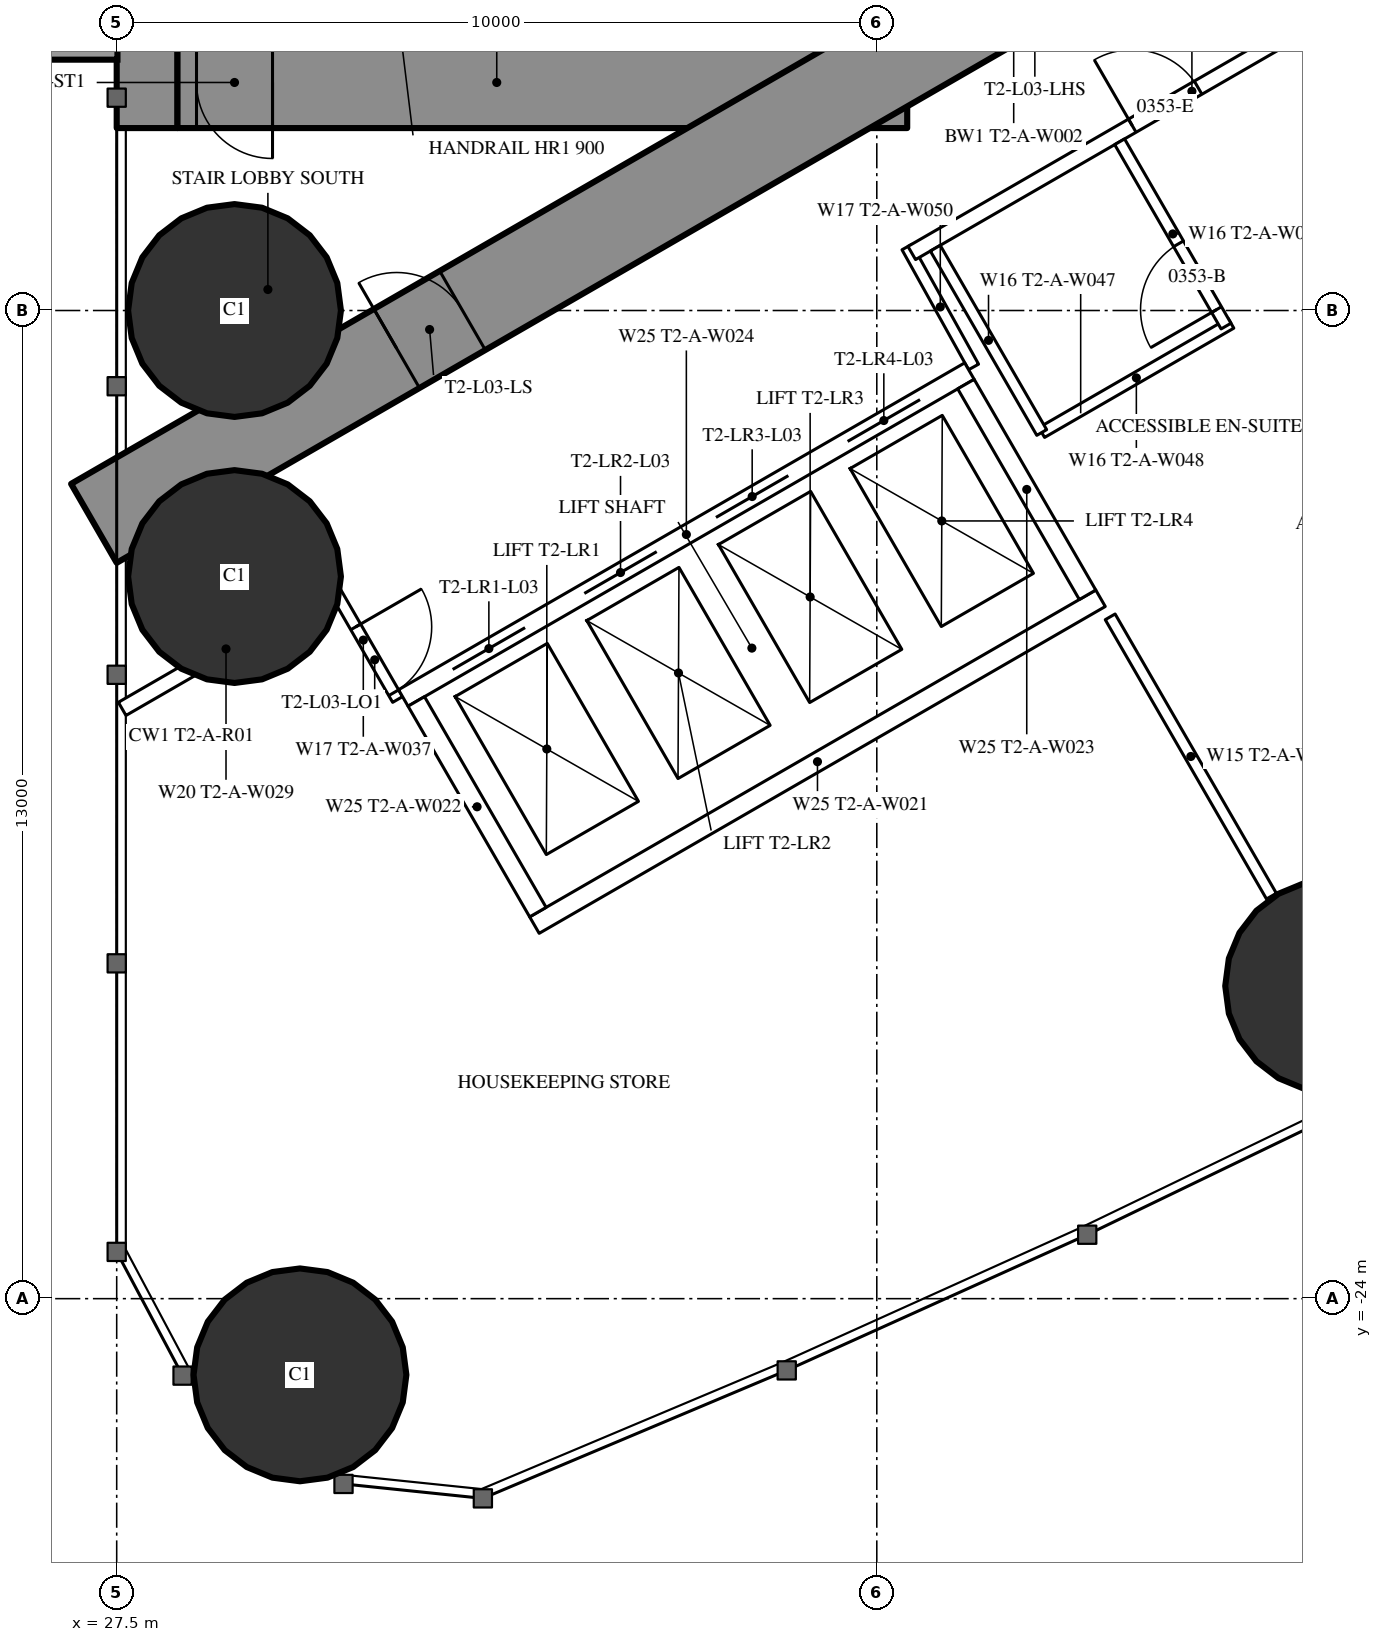
"""IFC4 building model, lengths in metres.
Left out: names, types, materials, properties, quantities, classifications, styles, units other than length and angle.
Written with IfcOpenShell. Run it as: python <this file> out.ifc"""

import sys

from ifc_helpers import new_model, si_unit, direction, frame, frame_2d, origin, origin_2d, place, context, subcontext, project, spatial, rectangle, hollow_circle, extrude, element, fill, save


model = new_model("IFC4")
c1 = context("Model", 3, precision=1e-05, world=origin(), true_north=direction((0.0, 1.0)))
c2 = subcontext(c1, "Body", "Model", "MODEL_VIEW")
j1 = project(units=[si_unit("LENGTHUNIT", "METRE"), si_unit("PLANEANGLEUNIT", "RADIAN")], contexts=[c1])
p1 = place(None, origin())
s1 = spatial("IfcSite", under=j1, at=p1, CompositionType="ELEMENT")
p2 = place(p1, origin())
s2 = spatial("IfcBuilding", under=s1, at=p2, CompositionType="ELEMENT")
p3 = place(p2, frame((0.0, 0.0, 18.0)))
s3 = spatial("IfcBuildingStorey", under=s2, at=p3, CompositionType="ELEMENT", Elevation=18.0)
for number, where, z_axis, x_axis in (
    (1, (29.911, -25.002, 0.0), (0.0, 0.0, 1.0), (1.0, 0.0, 0.0)),
    (2, (29.05, -11.0, 0.0), (0.0, 0.0, 1.0), (1.0, 0.0, 0.0)),
    (3, (29.05, -14.5, 0.0), (0.0, 0.0, 1.0), (1.0, 0.0, 0.0)),
    (4, (43.484, -19.886, 0.0), (0.0, 0.0, 1.0), (1.0, 0.0, 0.0)),
):
    element("IfcColumn", number, at=place(p3, frame(where, z_axis=z_axis, x_axis=x_axis)), inside=s3, PredefinedType="COLUMN", context=c2, shape_type="SweptSolid", body=[
        extrude(hollow_circle(Radius=1.4, WallThickness=0.12, at=origin_2d()), origin(), (0.0, 0.0, 1.0), 3.5),
    ])
p4 = place(p3, frame((27.9, -8.6, 0.0), z_axis=(0.0, 0.0, 1.0), x_axis=(0.0, 1.0, 0.0)))
e5 = element("IfcWall", 5, at=p4, inside=s3, PredefinedType="SHEAR", context=c2, shape_type="SweptSolid", body=[
    extrude(rectangle(XDim=17.2, YDim=0.8, at=frame_2d((8.6, 0.0))), origin(), (0.0, 0.0, 1.0), 3.5),
])
p5 = place(p4, frame((2.45, 0.0, 0.6)))
e6 = element("IfcOpeningElement", 6, at=p5, cuts=e5, PredefinedType="OPENING", context=c2, shape_type="SweptSolid", body=[
    extrude(rectangle(XDim=0.6, YDim=2.1, at=frame_2d((0.3, 1.05))), frame((0.0, 0.41, 0.0), z_axis=(0.0, -1.0, 0.0), x_axis=(1.0, 0.0, 0.0)), (0.0, 0.0, 1.0), 0.82),
])
p6 = place(p4, frame((14.15, 0.0, 0.6)))
e7 = element("IfcOpeningElement", 7, at=p6, cuts=e5, PredefinedType="OPENING", context=c2, shape_type="SweptSolid", body=[
    extrude(rectangle(XDim=0.6, YDim=2.1, at=frame_2d((0.3, 1.05))), frame((0.0, 0.41, 0.0), z_axis=(0.0, -1.0, 0.0), x_axis=(1.0, 0.0, 0.0)), (0.0, 0.0, 1.0), 0.82),
])
p7 = place(p3, frame((37.3, -8.6, 0.0), z_axis=(0.0, 0.0, 1.0), x_axis=(0.0, 1.0, 0.0)))
e8 = element("IfcWall", 8, at=p7, inside=s3, PredefinedType="SHEAR", context=c2, shape_type="SweptSolid", body=[
    extrude(rectangle(XDim=17.2, YDim=1.2, at=frame_2d((8.6, 0.0))), origin(), (0.0, 0.0, 1.0), 3.5),
])
p8 = place(p7, frame((7.7, 0.0, 0.0)))
e9 = element("IfcOpeningElement", 9, at=p8, cuts=e8, PredefinedType="OPENING", context=c2, shape_type="SweptSolid", body=[
    extrude(rectangle(XDim=1.8, YDim=2.2, at=frame_2d((0.9, 1.1))), frame((0.0, 0.61, 0.0), z_axis=(0.0, -1.0, 0.0), x_axis=(1.0, 0.0, 0.0)), (0.0, 0.0, 1.0), 1.22),
])
p9 = place(p3, frame((28.3, -8.0, 0.0), z_axis=(0.0, 0.0, 1.0), x_axis=(1.0, 0.0, 0.0)))
e10 = element("IfcWall", 10, at=p9, inside=s3, PredefinedType="SHEAR", context=c2, shape_type="SweptSolid", body=[
    extrude(rectangle(XDim=8.4, YDim=1.2, at=frame_2d((4.2, 0.0))), origin(), (0.0, 0.0, 1.0), 3.5),
])
p10 = place(p9, frame((0.25, 0.0, 0.0)))
e11 = element("IfcOpeningElement", 11, at=p10, cuts=e10, PredefinedType="OPENING", context=c2, shape_type="SweptSolid", body=[
    extrude(rectangle(XDim=1.0, YDim=2.2, at=frame_2d((0.5, 1.1))), frame((0.0, 0.61, 0.0), z_axis=(0.0, -1.0, 0.0), x_axis=(1.0, 0.0, 0.0)), (0.0, 0.0, 1.0), 1.22),
])
p11 = place(p3, frame((27.2, -13.8, 0.0), z_axis=(0.0, 0.0, 1.0), x_axis=(0.866027159892, 0.499996958321, 0.0)))
e12 = element("IfcWall", 12, at=p11, inside=s3, PredefinedType="SHEAR", context=c2, shape_type="SweptSolid", body=[
    extrude(rectangle(XDim=27.947, YDim=1.2, at=frame_2d((13.973, 0.0))), origin(), (0.0, 0.0, 1.0), 3.5),
])
p12 = place(p11, frame((4.6, 0.0, 0.0)))
e13 = element("IfcOpeningElement", 13, at=p12, cuts=e12, PredefinedType="OPENING", context=c2, shape_type="SweptSolid", body=[
    extrude(rectangle(XDim=1.0, YDim=2.2, at=frame_2d((0.5, 1.1))), frame((0.0, 0.61, 0.0), z_axis=(0.0, -1.0, 0.0), x_axis=(1.0, 0.0, 0.0)), (0.0, 0.0, 1.0), 1.22),
])
p13 = place(p11, frame((13.395, 0.0, 0.0)))
e14 = element("IfcOpeningElement", 14, at=p13, cuts=e12, PredefinedType="OPENING", context=c2, shape_type="SweptSolid", body=[
    extrude(rectangle(XDim=1.8, YDim=2.2, at=frame_2d((0.9, 1.1))), frame((0.0, 0.61, 0.0), z_axis=(0.0, -1.0, 0.0), x_axis=(1.0, 0.0, 0.0)), (0.0, 0.0, 1.0), 1.22),
])
p14 = place(p3, frame((40.57, -15.03, 0.0), z_axis=(0.0, 0.0, 1.0), x_axis=(0.500012993597, -0.866017901798, 0.0)))
e15 = element("IfcWall", 15, at=p14, inside=s3, PredefinedType="PARTITIONING", context=c2, shape_type="SweptSolid", body=[
    extrude(rectangle(XDim=4.243, YDim=0.15, at=frame_2d((2.122, 0.0))), origin(), (0.0, 0.0, 1.0), 3.25),
])
p15 = place(p3, frame((27.572, -16.241, 0.0), z_axis=(0.0, 0.0, 1.0), x_axis=(0.866029654818, 0.499992636921, 0.0)))
e16 = element("IfcWall", 16, at=p15, inside=s3, PredefinedType="PARTITIONING", context=c2, shape_type="SweptSolid", body=[
    extrude(rectangle(XDim=3.155, YDim=0.2, at=frame_2d((1.577, 0.0))), origin(), (0.0, 0.0, 1.0), 3.25),
])
p16 = place(p3, frame((38.773, -11.742, 0.0), z_axis=(0.0, 0.0, 1.0), x_axis=(-0.485528096672, 0.8742210632, 0.0)))
e17 = element("IfcWall", 17, at=p16, inside=s3, PredefinedType="PARTITIONING", context=c2, shape_type="SweptSolid", body=[
    extrude(rectangle(XDim=1.805, YDim=0.15, at=frame_2d((0.903, 0.0))), origin(), (0.0, 0.0, 1.0), 3.25),
])
p17 = place(p3, frame((30.293, -14.554, 0.0), z_axis=(0.0, 0.0, 1.0), x_axis=(0.499980071345, -0.866036909293, 0.0)))
e18 = element("IfcWall", 18, at=p17, inside=s3, PredefinedType="PARTITIONING", context=c2, shape_type="SweptSolid", body=[
    extrude(rectangle(XDim=1.805, YDim=0.15, at=frame_2d((0.902, 0.0))), origin(), (0.0, 0.0, 1.0), 3.25),
])
p18 = place(p17, frame((0.702, 0.0, 0.0)))
e19 = element("IfcOpeningElement", 19, at=p18, cuts=e18, PredefinedType="OPENING", context=c2, shape_type="SweptSolid", body=[
    extrude(rectangle(XDim=1.0, YDim=2.2, at=frame_2d((0.5, 1.1))), frame((0.0, 0.085, 0.0), z_axis=(0.0, -1.0, 0.0), x_axis=(1.0, 0.0, 0.0)), (0.0, 0.0, 1.0), 0.17),
])
p19 = place(p3, frame((37.96, -10.243, 0.0), z_axis=(0.0, 0.0, 1.0), x_axis=(0.866024617314, 0.500001362204, 0.0)))
e20 = element("IfcWall", 20, at=p19, inside=s3, PredefinedType="PARTITIONING", context=c2, shape_type="SweptSolid", body=[
    extrude(rectangle(XDim=8.512, YDim=0.2, at=frame_2d((4.256, 0.0))), origin(), (0.0, 0.0, 1.0), 3.25),
])
p20 = place(p19, frame((3.35, 0.0, 0.0)))
e21 = element("IfcOpeningElement", 21, at=p20, cuts=e20, PredefinedType="OPENING", context=c2, shape_type="SweptSolid", body=[
    extrude(rectangle(XDim=1.0, YDim=2.2, at=frame_2d((0.5, 1.1))), frame((0.0, 0.11, 0.0), z_axis=(0.0, -1.0, 0.0), x_axis=(1.0, 0.0, 0.0)), (0.0, 0.0, 1.0), 0.22),
])
p21 = place(p3, frame((39.67, -12.605, 0.0), z_axis=(0.0, 0.0, 1.0), x_axis=(0.866018712932, 0.500011588718, 0.0)))
e22 = element("IfcWall", 22, at=p21, inside=s3, PredefinedType="PARTITIONING", context=c2, shape_type="SweptSolid", body=[
    extrude(rectangle(XDim=2.875, YDim=0.15, at=frame_2d((1.438, 0.0))), origin(), (0.0, 0.0, 1.0), 3.25),
])
p22 = place(p3, frame((40.695, -8.78, 0.0), z_axis=(0.0, 0.0, 1.0), x_axis=(0.500049511043, -0.865996816683, 0.0)))
e23 = element("IfcWall", 23, at=p22, inside=s3, PredefinedType="PARTITIONING", context=c2, shape_type="SweptSolid", body=[
    extrude(rectangle(XDim=2.8, YDim=0.15, at=frame_2d((1.4, 0.0))), origin(), (0.0, 0.0, 1.0), 3.25),
])
p23 = place(p22, frame((1.55, 0.0, 0.0)))
e24 = element("IfcOpeningElement", 24, at=p23, cuts=e23, PredefinedType="OPENING", context=c2, shape_type="SweptSolid", body=[
    extrude(rectangle(XDim=1.0, YDim=2.2, at=frame_2d((0.5, 1.1))), frame((0.0, 0.085, 0.0), z_axis=(0.0, -1.0, 0.0), x_axis=(1.0, 0.0, 0.0)), (0.0, 0.0, 1.0), 0.17),
])
p24 = place(p3, frame((38.27, -10.18, 0.0), z_axis=(0.0, 0.0, 1.0), x_axis=(0.500049511043, -0.865996816683, 0.0)))
e25 = element("IfcWall", 25, at=p24, inside=s3, PredefinedType="PARTITIONING", context=c2, shape_type="SweptSolid", body=[
    extrude(rectangle(XDim=2.8, YDim=0.15, at=frame_2d((1.4, 0.0))), origin(), (0.0, 0.0, 1.0), 3.25),
])
p25 = place(p3, frame((31.271, -16.097, 0.0), z_axis=(0.0, 0.0, 1.0), x_axis=(0.86604045752, 0.499973925258, 0.0)))
e26 = element("IfcWall", 26, at=p25, inside=s3, PredefinedType="PARTITIONING", context=c2, shape_type="SweptSolid", body=[
    extrude(rectangle(XDim=8.6, YDim=0.25, at=frame_2d((4.3, 0.0))), origin(), (0.0, 0.0, 1.0), 3.25),
])
p26 = place(p25, frame((0.75, 0.0, 0.0)))
e27 = element("IfcOpeningElement", 27, at=p26, cuts=e26, PredefinedType="OPENING", context=c2, shape_type="SweptSolid", body=[
    extrude(rectangle(XDim=1.1, YDim=2.2, at=frame_2d((0.55, 1.1))), frame((0.0, 0.135, 0.0), z_axis=(0.0, -1.0, 0.0), x_axis=(1.0, 0.0, 0.0)), (0.0, 0.0, 1.0), 0.27),
])
p27 = place(p25, frame((2.75, 0.0, 0.0)))
e28 = element("IfcOpeningElement", 28, at=p27, cuts=e26, PredefinedType="OPENING", context=c2, shape_type="SweptSolid", body=[
    extrude(rectangle(XDim=1.1, YDim=2.2, at=frame_2d((0.55, 1.1))), frame((0.0, 0.135, 0.0), z_axis=(0.0, -1.0, 0.0), x_axis=(1.0, 0.0, 0.0)), (0.0, 0.0, 1.0), 0.27),
])
p28 = place(p25, frame((4.75, 0.0, 0.0)))
e29 = element("IfcOpeningElement", 29, at=p28, cuts=e26, PredefinedType="OPENING", context=c2, shape_type="SweptSolid", body=[
    extrude(rectangle(XDim=1.1, YDim=2.2, at=frame_2d((0.55, 1.1))), frame((0.0, 0.135, 0.0), z_axis=(0.0, -1.0, 0.0), x_axis=(1.0, 0.0, 0.0)), (0.0, 0.0, 1.0), 0.27),
])
p29 = place(p25, frame((6.75, 0.0, 0.0)))
e30 = element("IfcOpeningElement", 30, at=p29, cuts=e26, PredefinedType="OPENING", context=c2, shape_type="SweptSolid", body=[
    extrude(rectangle(XDim=1.1, YDim=2.2, at=frame_2d((0.55, 1.1))), frame((0.0, 0.135, 0.0), z_axis=(0.0, -1.0, 0.0), x_axis=(1.0, 0.0, 0.0)), (0.0, 0.0, 1.0), 0.27),
])
p30 = place(p3, frame((32.996, -19.086, 0.0), z_axis=(0.0, 0.0, 1.0), x_axis=(0.866028165386, 0.499995216735, 0.0)))
e31 = element("IfcWall", 31, at=p30, inside=s3, PredefinedType="PARTITIONING", context=c2, shape_type="SweptSolid", body=[
    extrude(rectangle(XDim=8.6, YDim=0.25, at=frame_2d((4.3, 0.0))), origin(), (0.0, 0.0, 1.0), 3.25),
])
for number, where, z_axis, x_axis in (
    (32, (31.441, -16.143, 0.0), (0.0, 0.0, 1.0), (0.5, -0.866, 0.0)),
    (33, (38.673, -11.968, 0.0), (0.0, 0.0, 1.0), (0.5, -0.866, 0.0)),
):
    element("IfcWall", number, at=place(p3, frame(where, z_axis=z_axis, x_axis=x_axis)), inside=s3, PredefinedType="PARTITIONING", context=c2, shape_type="SweptSolid", body=[
        extrude(rectangle(XDim=3.201, YDim=0.25, at=frame_2d((1.6, 0.0))), origin(), (0.0, 0.0, 1.0), 3.25),
    ])
p31 = place(p23, origin())
e34 = element("IfcDoor", 34, at=p31, inside=s3, OperationType="SINGLE_SWING_RIGHT", PredefinedType="DOOR", context=c2, shape_type="SweptSolid", body=[
    extrude(rectangle(XDim=1.0, YDim=2.2, at=frame_2d((0.5, 1.1))), frame((0.0, 0.025, 0.0), z_axis=(0.0, -1.0, 0.0), x_axis=(1.0, 0.0, 0.0)), (0.0, 0.0, 1.0), 0.05),
])
fill(e24, e34)
p32 = place(p20, origin())
e35 = element("IfcDoor", 35, at=p32, inside=s3, OperationType="SINGLE_SWING_LEFT", PredefinedType="DOOR", context=c2, shape_type="SweptSolid", body=[
    extrude(rectangle(XDim=1.0, YDim=2.2, at=frame_2d((0.5, 1.1))), frame((0.0, 0.025, 0.0), z_axis=(0.0, -1.0, 0.0), x_axis=(1.0, 0.0, 0.0)), (0.0, 0.0, 1.0), 0.05),
])
fill(e21, e35)
p33 = place(p18, origin())
e36 = element("IfcDoor", 36, at=p33, inside=s3, OperationType="SINGLE_SWING_LEFT", PredefinedType="DOOR", context=c2, shape_type="SweptSolid", body=[
    extrude(rectangle(XDim=1.0, YDim=2.2, at=frame_2d((0.5, 1.1))), frame((0.0, 0.025, 0.0), z_axis=(0.0, -1.0, 0.0), x_axis=(1.0, 0.0, 0.0)), (0.0, 0.0, 1.0), 0.05),
])
fill(e19, e36)
p34 = place(p12, origin())
e37 = element("IfcDoor", 37, at=p34, inside=s3, OperationType="SINGLE_SWING_LEFT", PredefinedType="DOOR", context=c2, shape_type="SweptSolid", body=[
    extrude(rectangle(XDim=1.0, YDim=2.2, at=frame_2d((0.5, 1.1))), frame((0.0, 0.025, 0.0), z_axis=(0.0, -1.0, 0.0), x_axis=(1.0, 0.0, 0.0)), (0.0, 0.0, 1.0), 0.05),
])
fill(e13, e37)
p35 = place(p10, origin())
e38 = element("IfcDoor", 38, at=p35, inside=s3, OperationType="SINGLE_SWING_RIGHT", PredefinedType="DOOR", context=c2, shape_type="SweptSolid", body=[
    extrude(rectangle(XDim=1.0, YDim=2.2, at=frame_2d((0.5, 1.1))), frame((0.0, 0.025, 0.0), z_axis=(0.0, -1.0, 0.0), x_axis=(1.0, 0.0, 0.0)), (0.0, 0.0, 1.0), 0.05),
])
fill(e11, e38)
p36 = place(p26, origin())
e39 = element("IfcDoor", 39, at=p36, inside=s3, OperationType="DOUBLE_DOOR_SLIDING", PredefinedType="USERDEFINED", context=c2, shape_type="SweptSolid", body=[
    extrude(rectangle(XDim=1.1, YDim=2.2, at=frame_2d((0.55, 1.1))), frame((0.0, 0.025, 0.0), z_axis=(0.0, -1.0, 0.0), x_axis=(1.0, 0.0, 0.0)), (0.0, 0.0, 1.0), 0.05),
])
fill(e27, e39)
p37 = place(p27, origin())
e40 = element("IfcDoor", 40, at=p37, inside=s3, OperationType="DOUBLE_DOOR_SLIDING", PredefinedType="USERDEFINED", context=c2, shape_type="SweptSolid", body=[
    extrude(rectangle(XDim=1.1, YDim=2.2, at=frame_2d((0.55, 1.1))), frame((0.0, 0.025, 0.0), z_axis=(0.0, -1.0, 0.0), x_axis=(1.0, 0.0, 0.0)), (0.0, 0.0, 1.0), 0.05),
])
fill(e28, e40)
p38 = place(p28, origin())
e41 = element("IfcDoor", 41, at=p38, inside=s3, OperationType="DOUBLE_DOOR_SLIDING", PredefinedType="USERDEFINED", context=c2, shape_type="SweptSolid", body=[
    extrude(rectangle(XDim=1.1, YDim=2.2, at=frame_2d((0.55, 1.1))), frame((0.0, 0.025, 0.0), z_axis=(0.0, -1.0, 0.0), x_axis=(1.0, 0.0, 0.0)), (0.0, 0.0, 1.0), 0.05),
])
fill(e29, e41)
p39 = place(p29, origin())
e42 = element("IfcDoor", 42, at=p39, inside=s3, OperationType="DOUBLE_DOOR_SLIDING", PredefinedType="USERDEFINED", context=c2, shape_type="SweptSolid", body=[
    extrude(rectangle(XDim=1.1, YDim=2.2, at=frame_2d((0.55, 1.1))), frame((0.0, 0.025, 0.0), z_axis=(0.0, -1.0, 0.0), x_axis=(1.0, 0.0, 0.0)), (0.0, 0.0, 1.0), 0.05),
])
fill(e30, e42)
save(model, sys.argv[1])
